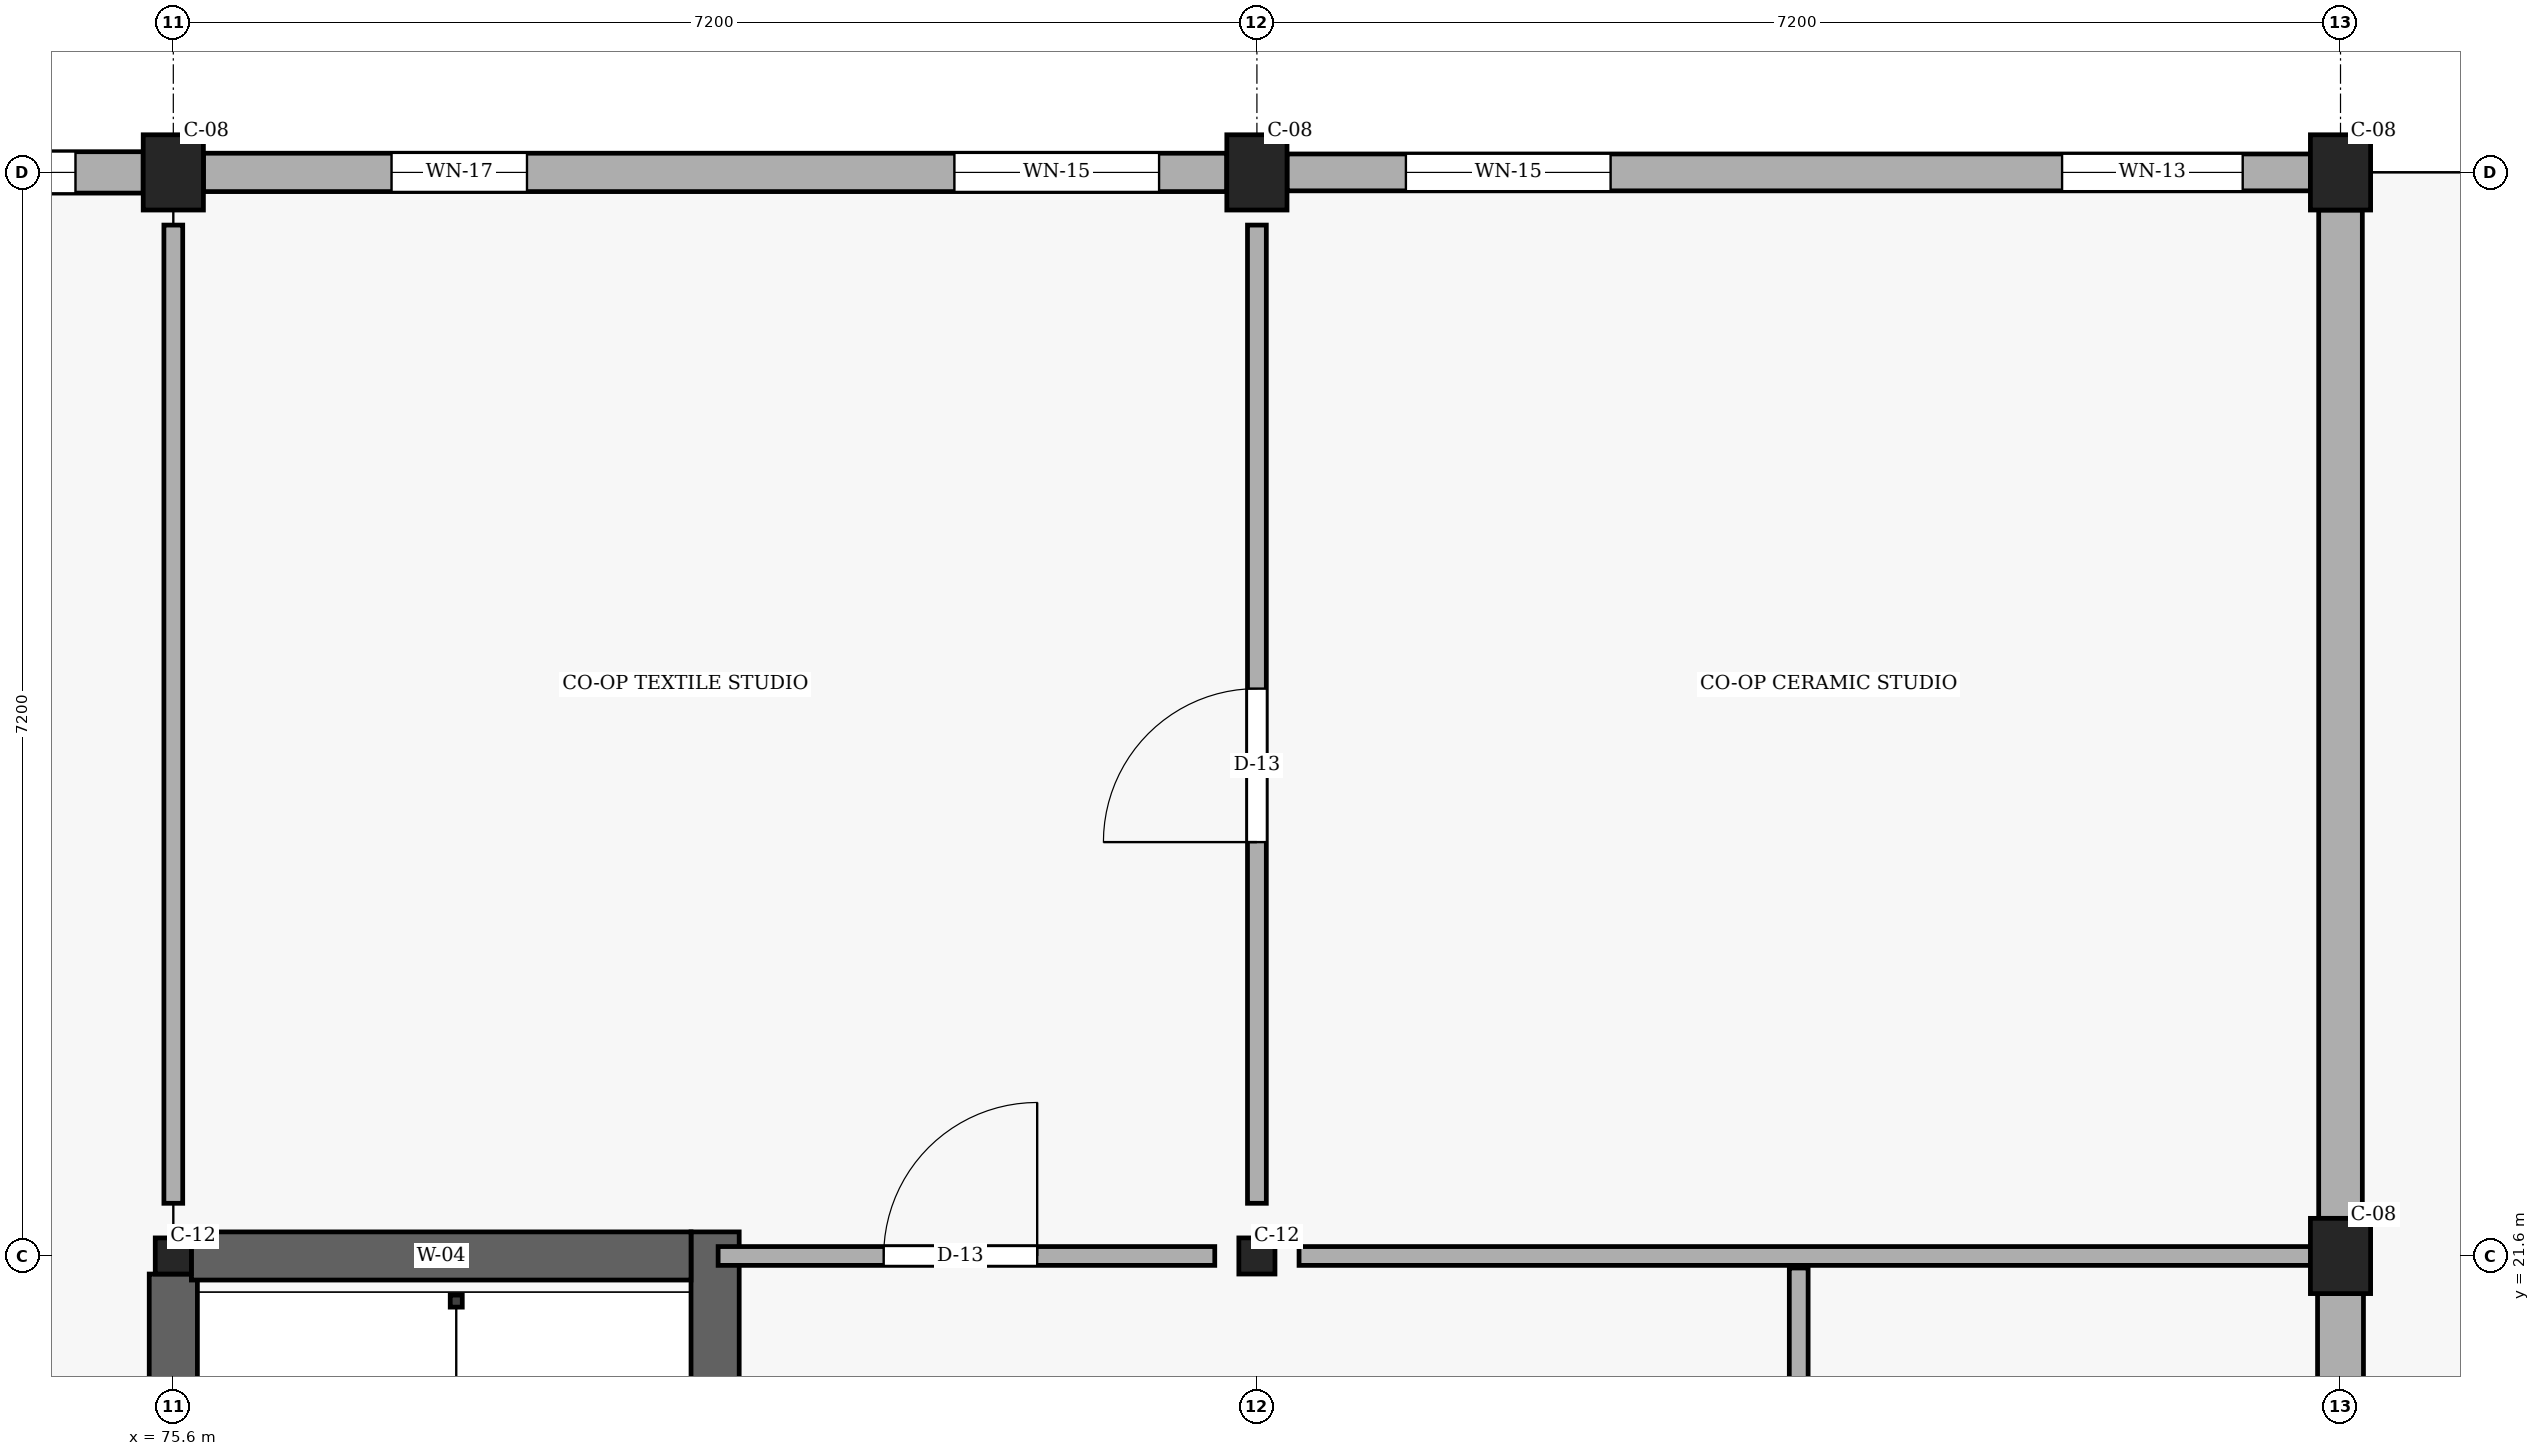
"""IFC4 building model, lengths in metres.
Left out: names, types, materials, properties, quantities, classifications, styles, units other than length and angle.
Written with IfcOpenShell. Run it as: python <this file> out.ifc"""

import sys

from ifc_helpers import new_model, si_unit, direction, frame, frame_2d, origin, origin_2d, place, context, subcontext, project, spatial, rectangle, i_section, extrude, element, fill, save


model = new_model("IFC4")
c1 = context("Model", 3, precision=1e-05, world=origin(), true_north=direction((0.0, 1.0)))
c2 = subcontext(c1, "Body", "Model", "MODEL_VIEW")
j1 = project(units=[si_unit("LENGTHUNIT", "METRE"), si_unit("PLANEANGLEUNIT", "RADIAN")], contexts=[c1])
p1 = place(None, origin())
s1 = spatial("IfcSite", under=j1, at=p1, CompositionType="ELEMENT")
p2 = place(p1, origin())
s2 = spatial("IfcBuilding", under=s1, at=p2, CompositionType="ELEMENT")
p3 = place(p2, frame((0.0, 0.0, 4.5)))
s3 = spatial("IfcBuildingStorey", under=s2, at=p3, CompositionType="ELEMENT", Elevation=4.5)
p4 = place(p3, frame((75.6, 21.6, 0.0), z_axis=(0.0, 0.0, 1.0), x_axis=(1.0, 0.0, 0.0)))
e1 = element("IfcColumn", 1, at=p4, inside=s3, PredefinedType="COLUMN", context=c2, shape_type="SweptSolid", body=[
    extrude(i_section(OverallWidth=0.24, OverallDepth=0.24, WebThickness=0.01, FlangeThickness=0.017, FilletRadius=0.021, at=origin_2d()), origin(), (0.0, 0.0, 1.0), 3.15),
])
p5 = place(p3, frame((75.6, 28.8, 0.0), z_axis=(0.0, 0.0, 1.0), x_axis=(1.0, 0.0, 0.0)))
e2 = element("IfcColumn", 2, at=p5, inside=s3, PredefinedType="COLUMN", context=c2, shape_type="SweptSolid", body=[
    extrude(rectangle(XDim=0.4, YDim=0.5, at=origin_2d()), origin(), (0.0, 0.0, 1.0), 3.15),
])
p6 = place(p3, frame((82.8, 21.6, 0.0), z_axis=(0.0, 0.0, 1.0), x_axis=(1.0, 0.0, 0.0)))
e3 = element("IfcColumn", 3, at=p6, inside=s3, PredefinedType="COLUMN", context=c2, shape_type="SweptSolid", body=[
    extrude(i_section(OverallWidth=0.24, OverallDepth=0.24, WebThickness=0.01, FlangeThickness=0.017, FilletRadius=0.021, at=origin_2d()), origin(), (0.0, 0.0, 1.0), 3.15),
])
for number, where, z_axis, x_axis in (
    (4, (82.8, 28.8, 0.0), (0.0, 0.0, 1.0), (1.0, 0.0, 0.0)),
    (5, (90.0, 21.6, 0.0), (0.0, 0.0, 1.0), (1.0, 0.0, 0.0)),
    (6, (90.0, 28.8, 0.0), (0.0, 0.0, 1.0), (1.0, 0.0, 0.0)),
):
    element("IfcColumn", number, at=place(p3, frame(where, z_axis=z_axis, x_axis=x_axis)), inside=s3, PredefinedType="COLUMN", context=c2, shape_type="SweptSolid", body=[
        extrude(rectangle(XDim=0.4, YDim=0.5, at=origin_2d()), origin(), (0.0, 0.0, 1.0), 3.15),
    ])
p7 = place(p3, frame((90.0, 14.65, 0.0), z_axis=(0.0, 0.0, 1.0), x_axis=(0.0, 1.0, 0.0)))
e7 = element("IfcWall", 7, at=p7, inside=s3, PredefinedType="SOLIDWALL", context=c2, shape_type="SweptSolid", body=[
    extrude(rectangle(XDim=6.7, YDim=0.305, at=frame_2d((3.35, 0.0))), origin(), (0.0, 0.0, 1.0), 2.34),
])
p8 = place(p3, frame((90.0, 21.85, 0.0), z_axis=(0.0, 0.0, 1.0), x_axis=(0.0, 1.0, 0.0)))
e8 = element("IfcWall", 8, at=p8, inside=s3, PredefinedType="SOLIDWALL", context=c2, shape_type="SweptSolid", body=[
    extrude(rectangle(XDim=6.7, YDim=0.29, at=frame_2d((3.35, 0.0))), origin(), (0.0, 0.0, 1.0), 2.34),
])
p9 = place(p3, frame((89.8, 28.8, 0.0), z_axis=(0.0, 0.0, 1.0), x_axis=(-1.0, 0.0, 0.0)))
e9 = element("IfcWall", 9, at=p9, inside=s3, PredefinedType="SOLIDWALL", context=c2, shape_type="SweptSolid", body=[
    extrude(rectangle(XDim=6.8, YDim=0.245, at=frame_2d((3.4, 0.0))), origin(), (0.0, 0.0, 1.0), 2.34),
])
p10 = place(p9, frame((0.45, 0.0, 0.78)))
e10 = element("IfcOpeningElement", 10, at=p10, cuts=e9, PredefinedType="OPENING", context=c2, shape_type="SweptSolid", body=[
    extrude(rectangle(XDim=1.2, YDim=1.26, at=frame_2d((0.6, 0.63))), frame((0.0, 0.133, 0.0), z_axis=(0.0, -1.0, 0.0), x_axis=(1.0, 0.0, 0.0)), (0.0, 0.0, 1.0), 0.265),
])
p11 = place(p9, frame((4.65, 0.0, 0.78)))
e11 = element("IfcOpeningElement", 11, at=p11, cuts=e9, PredefinedType="OPENING", context=c2, shape_type="SweptSolid", body=[
    extrude(rectangle(XDim=1.36, YDim=1.26, at=frame_2d((0.68, 0.63))), frame((0.0, 0.133, 0.0), z_axis=(0.0, -1.0, 0.0), x_axis=(1.0, 0.0, 0.0)), (0.0, 0.0, 1.0), 0.265),
])
p12 = place(p3, frame((82.6, 28.8, 0.0), z_axis=(0.0, 0.0, 1.0), x_axis=(-1.0, 0.0, 0.0)))
e12 = element("IfcWall", 12, at=p12, inside=s3, PredefinedType="SOLIDWALL", context=c2, shape_type="SweptSolid", body=[
    extrude(rectangle(XDim=6.8, YDim=0.255, at=frame_2d((3.4, 0.0))), origin(), (0.0, 0.0, 1.0), 2.34),
])
p13 = place(p12, frame((0.45, 0.0, 0.78)))
e13 = element("IfcOpeningElement", 13, at=p13, cuts=e12, PredefinedType="OPENING", context=c2, shape_type="SweptSolid", body=[
    extrude(rectangle(XDim=1.36, YDim=1.26, at=frame_2d((0.68, 0.63))), frame((0.0, 0.137, 0.0), z_axis=(0.0, -1.0, 0.0), x_axis=(1.0, 0.0, 0.0)), (0.0, 0.0, 1.0), 0.275),
])
p14 = place(p12, frame((4.65, 0.0, 0.78)))
e14 = element("IfcOpeningElement", 14, at=p14, cuts=e12, PredefinedType="OPENING", context=c2, shape_type="SweptSolid", body=[
    extrude(rectangle(XDim=0.9, YDim=1.36, at=frame_2d((0.45, 0.68))), frame((0.0, 0.137, 0.0), z_axis=(0.0, -1.0, 0.0), x_axis=(1.0, 0.0, 0.0)), (0.0, 0.0, 1.0), 0.275),
])
p15 = place(p3, frame((75.4, 28.8, 0.0), z_axis=(0.0, 0.0, 1.0), x_axis=(-1.0, 0.0, 0.0)))
e15 = element("IfcWall", 15, at=p15, inside=s3, PredefinedType="SOLIDWALL", context=c2, shape_type="SweptSolid", body=[
    extrude(rectangle(XDim=6.8, YDim=0.275, at=frame_2d((3.4, 0.0))), origin(), (0.0, 0.0, 1.0), 2.34),
])
p16 = place(p15, frame((0.45, 0.0, 0.78)))
e16 = element("IfcOpeningElement", 16, at=p16, cuts=e15, PredefinedType="OPENING", context=c2, shape_type="SweptSolid", body=[
    extrude(rectangle(XDim=0.9, YDim=1.36, at=frame_2d((0.45, 0.68))), frame((0.0, 0.147, 0.0), z_axis=(0.0, -1.0, 0.0), x_axis=(1.0, 0.0, 0.0)), (0.0, 0.0, 1.0), 0.295),
])
p17 = place(p15, frame((4.65, 0.0, 0.78)))
e17 = element("IfcOpeningElement", 17, at=p17, cuts=e15, PredefinedType="OPENING", context=c2, shape_type="SweptSolid", body=[
    extrude(rectangle(XDim=1.06, YDim=1.36, at=frame_2d((0.53, 0.68))), frame((0.0, 0.147, 0.0), z_axis=(0.0, -1.0, 0.0), x_axis=(1.0, 0.0, 0.0)), (0.0, 0.0, 1.0), 0.295),
])
p18 = place(p3, frame((75.6, 14.52, 0.0), z_axis=(0.0, 0.0, 1.0), x_axis=(0.0, 1.0, 0.0)))
e18 = element("IfcWall", 18, at=p18, inside=s3, PredefinedType="SHEAR", context=c2, shape_type="SweptSolid", body=[
    extrude(rectangle(XDim=6.96, YDim=0.32, at=frame_2d((3.48, 0.0))), origin(), (0.0, 0.0, 1.0), 2.89),
])
p19 = place(p3, frame((79.2, 14.24, 0.0), z_axis=(0.0, 0.0, 1.0), x_axis=(0.0, 1.0, 0.0)))
e19 = element("IfcWall", 19, at=p19, inside=s3, PredefinedType="SHEAR", context=c2, shape_type="SweptSolid", body=[
    extrude(rectangle(XDim=7.52, YDim=0.32, at=frame_2d((3.76, 0.0))), origin(), (0.0, 0.0, 1.0), 2.89),
])
p20 = place(p3, frame((75.72, 21.6, 0.0), z_axis=(0.0, 0.0, 1.0), x_axis=(1.0, 0.0, 0.0)))
e20 = element("IfcWall", 20, at=p20, inside=s3, PredefinedType="SHEAR", context=c2, shape_type="SweptSolid", body=[
    extrude(rectangle(XDim=3.32, YDim=0.32, at=frame_2d((1.66, 0.0))), origin(), (0.0, 0.0, 1.0), 2.89),
])
p21 = place(p3, frame((75.6, 21.95, 0.0), z_axis=(0.0, 0.0, 1.0), x_axis=(0.0, 1.0, 0.0)))
e21 = element("IfcWall", 21, at=p21, inside=s3, PredefinedType="PARTITIONING", context=c2, shape_type="SweptSolid", body=[
    extrude(rectangle(XDim=6.5, YDim=0.125, at=frame_2d((3.25, 0.0))), origin(), (0.0, 0.0, 1.0), 2.29),
])
p22 = place(p3, frame((86.4, 14.48, 0.0), z_axis=(0.0, 0.0, 1.0), x_axis=(0.0, 1.0, 0.0)))
e22 = element("IfcWall", 22, at=p22, inside=s3, PredefinedType="PARTITIONING", context=c2, shape_type="SweptSolid", body=[
    extrude(rectangle(XDim=7.04, YDim=0.125, at=frame_2d((3.52, 0.0))), origin(), (0.0, 0.0, 1.0), 2.29),
])
p23 = place(p3, frame((79.22, 21.6, 0.0), z_axis=(0.0, 0.0, 1.0), x_axis=(1.0, 0.0, 0.0)))
e23 = element("IfcWall", 23, at=p23, inside=s3, PredefinedType="PARTITIONING", context=c2, shape_type="SweptSolid", body=[
    extrude(rectangle(XDim=3.3, YDim=0.125, at=frame_2d((1.65, 0.0))), origin(), (0.0, 0.0, 1.0), 2.29),
])
p24 = place(p23, frame((1.1, 0.0, 0.0)))
e24 = element("IfcOpeningElement", 24, at=p24, cuts=e23, PredefinedType="OPENING", context=c2, shape_type="SweptSolid", body=[
    extrude(rectangle(XDim=1.02, YDim=2.15, at=frame_2d((0.51, 1.075))), frame((0.0, 0.073, 0.0), z_axis=(0.0, -1.0, 0.0), x_axis=(1.0, 0.0, 0.0)), (0.0, 0.0, 1.0), 0.145),
])
p25 = place(p3, frame((83.08, 21.6, 0.0), z_axis=(0.0, 0.0, 1.0), x_axis=(1.0, 0.0, 0.0)))
e25 = element("IfcWall", 25, at=p25, inside=s3, PredefinedType="PARTITIONING", context=c2, shape_type="SweptSolid", body=[
    extrude(rectangle(XDim=6.745, YDim=0.125, at=frame_2d((3.373, 0.0))), origin(), (0.0, 0.0, 1.0), 2.29),
])
p26 = place(p3, frame((82.8, 21.95, 0.0), z_axis=(0.0, 0.0, 1.0), x_axis=(0.0, 1.0, 0.0)))
e26 = element("IfcWall", 26, at=p26, inside=s3, PredefinedType="PARTITIONING", context=c2, shape_type="SweptSolid", body=[
    extrude(rectangle(XDim=6.5, YDim=0.125, at=frame_2d((3.25, 0.0))), origin(), (0.0, 0.0, 1.0), 2.29),
])
p27 = place(p26, frame((2.4, 0.0, 0.0)))
e27 = element("IfcOpeningElement", 27, at=p27, cuts=e26, PredefinedType="OPENING", context=c2, shape_type="SweptSolid", body=[
    extrude(rectangle(XDim=1.02, YDim=2.15, at=frame_2d((0.51, 1.075))), frame((0.0, 0.073, 0.0), z_axis=(0.0, -1.0, 0.0), x_axis=(1.0, 0.0, 0.0)), (0.0, 0.0, 1.0), 0.145),
])
p28 = place(p10, origin())
e28 = element("IfcWindow", 28, at=p28, inside=s3, PartitioningType="SINGLE_PANEL", PredefinedType="WINDOW", context=c2, shape_type="SweptSolid", body=[
    extrude(rectangle(XDim=1.2, YDim=1.26, at=frame_2d((0.6, 0.63))), frame((0.0, 0.03, 0.0), z_axis=(0.0, -1.0, 0.0), x_axis=(1.0, 0.0, 0.0)), (0.0, 0.0, 1.0), 0.06),
])
fill(e10, e28)
p29 = place(p11, origin())
e29 = element("IfcWindow", 29, at=p29, inside=s3, PartitioningType="SINGLE_PANEL", PredefinedType="WINDOW", context=c2, shape_type="SweptSolid", body=[
    extrude(rectangle(XDim=1.36, YDim=1.26, at=frame_2d((0.68, 0.63))), frame((0.0, 0.03, 0.0), z_axis=(0.0, -1.0, 0.0), x_axis=(1.0, 0.0, 0.0)), (0.0, 0.0, 1.0), 0.06),
])
fill(e11, e29)
p30 = place(p13, origin())
e30 = element("IfcWindow", 30, at=p30, inside=s3, PartitioningType="SINGLE_PANEL", PredefinedType="WINDOW", context=c2, shape_type="SweptSolid", body=[
    extrude(rectangle(XDim=1.36, YDim=1.26, at=frame_2d((0.68, 0.63))), frame((0.0, 0.03, 0.0), z_axis=(0.0, -1.0, 0.0), x_axis=(1.0, 0.0, 0.0)), (0.0, 0.0, 1.0), 0.06),
])
fill(e13, e30)
p31 = place(p14, origin())
e31 = element("IfcWindow", 31, at=p31, inside=s3, PartitioningType="SINGLE_PANEL", PredefinedType="WINDOW", context=c2, shape_type="SweptSolid", body=[
    extrude(rectangle(XDim=0.9, YDim=1.36, at=frame_2d((0.45, 0.68))), frame((0.0, 0.03, 0.0), z_axis=(0.0, -1.0, 0.0), x_axis=(1.0, 0.0, 0.0)), (0.0, 0.0, 1.0), 0.06),
])
fill(e14, e31)
p32 = place(p16, origin())
e32 = element("IfcWindow", 32, at=p32, inside=s3, PartitioningType="SINGLE_PANEL", PredefinedType="WINDOW", context=c2, shape_type="SweptSolid", body=[
    extrude(rectangle(XDim=0.9, YDim=1.36, at=frame_2d((0.45, 0.68))), frame((0.0, 0.03, 0.0), z_axis=(0.0, -1.0, 0.0), x_axis=(1.0, 0.0, 0.0)), (0.0, 0.0, 1.0), 0.06),
])
fill(e16, e32)
p33 = place(p24, origin())
e33 = element("IfcDoor", 33, at=p33, inside=s3, OperationType="SINGLE_SWING_RIGHT", PredefinedType="DOOR", context=c2, shape_type="SweptSolid", body=[
    extrude(rectangle(XDim=1.02, YDim=2.15, at=frame_2d((0.51, 1.075))), frame((0.0, 0.025, 0.0), z_axis=(0.0, -1.0, 0.0), x_axis=(1.0, 0.0, 0.0)), (0.0, 0.0, 1.0), 0.05),
])
fill(e24, e33)
p34 = place(p27, origin())
e34 = element("IfcDoor", 34, at=p34, inside=s3, OperationType="SINGLE_SWING_LEFT", PredefinedType="DOOR", context=c2, shape_type="SweptSolid", body=[
    extrude(rectangle(XDim=1.02, YDim=2.15, at=frame_2d((0.51, 1.075))), frame((0.0, 0.025, 0.0), z_axis=(0.0, -1.0, 0.0), x_axis=(1.0, 0.0, 0.0)), (0.0, 0.0, 1.0), 0.05),
])
fill(e27, e34)
save(model, sys.argv[1])
